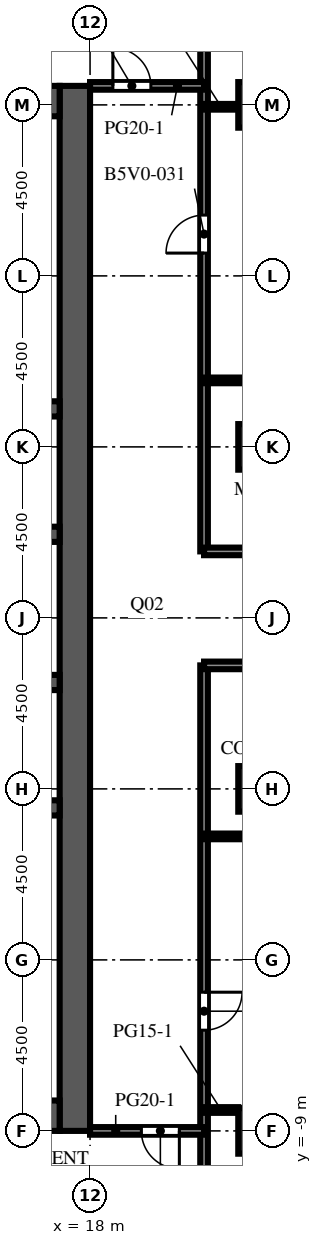
"""IFC4 building model, lengths in metres.
Left out: names, types, materials, properties, quantities, classifications, styles, units other than length and angle.
Written with IfcOpenShell. Run it as: python <this file> out.ifc"""

import sys

from ifc_helpers import new_model, si_unit, direction, frame, frame_2d, origin, origin_2d, place, context, subcontext, project, spatial, rectangle, extrude, element, fill, save


model = new_model("IFC4")
c1 = context("Model", 3, precision=1e-05, world=origin(), true_north=direction((0.0, 1.0)))
c2 = subcontext(c1, "Body", "Model", "MODEL_VIEW")
j1 = project(units=[si_unit("LENGTHUNIT", "METRE"), si_unit("PLANEANGLEUNIT", "RADIAN")], contexts=[c1])
p1 = place(None, origin())
s1 = spatial("IfcSite", under=j1, at=p1, CompositionType="ELEMENT")
p2 = place(p1, origin())
s2 = spatial("IfcBuilding", under=s1, at=p2, CompositionType="ELEMENT")
p3 = place(p2, frame((0.0, 0.0, 160.9)))
s3 = spatial("IfcBuildingStorey", under=s2, at=p3, CompositionType="ELEMENT", Elevation=160.9)
for number, where, z_axis, x_axis in (
    (1, (22.5, -9.0, 0.0), (0.0, 0.0, 1.0), (1.0, 0.0, 0.0)),
    (2, (22.5, 0.0, 0.0), (0.0, 0.0, 1.0), (1.0, 0.0, 0.0)),
    (3, (22.5, 9.0, 0.0), (0.0, 0.0, 1.0), (1.0, 0.0, 0.0)),
    (4, (22.5, 18.0, 0.0), (0.0, 0.0, 1.0), (1.0, 0.0, 0.0)),
):
    element("IfcColumn", number, at=place(p3, frame(where, z_axis=z_axis, x_axis=x_axis)), inside=s3, PredefinedType="COLUMN", context=c2, shape_type="SweptSolid", body=[
        extrude(rectangle(XDim=1.2, YDim=1.2, at=origin_2d()), origin(), (0.0, 0.0, 1.0), 4.1),
    ])
p4 = place(p3, frame((17.6, -9.0, 0.0), z_axis=(0.0, 0.0, 1.0), x_axis=(0.0, 1.0, 0.0)))
e5 = element("IfcWall", 5, at=p4, inside=s3, PredefinedType="SHEAR", context=c2, shape_type="SweptSolid", body=[
    extrude(rectangle(XDim=27.5, YDim=0.8, at=frame_2d((13.75, 0.0))), origin(), (0.0, 0.0, 1.0), 4.1),
])
p5 = place(p4, frame((12.55, 0.0, 0.0)))
e6 = element("IfcOpeningElement", 6, at=p5, cuts=e5, PredefinedType="OPENING", context=c2, shape_type="SweptSolid", body=[
    extrude(rectangle(XDim=2.4, YDim=2.4, at=frame_2d((1.2, 1.2))), frame((0.0, 0.41, 0.0), z_axis=(0.0, -1.0, 0.0), x_axis=(1.0, 0.0, 0.0)), (0.0, 0.0, 1.0), 0.82),
])
p6 = place(p4, frame((6.825, 0.0, 0.0)))
e7 = element("IfcOpeningElement", 7, at=p6, cuts=e5, PredefinedType="OPENING", context=c2, shape_type="SweptSolid", body=[
    extrude(rectangle(XDim=1.2, YDim=2.1, at=frame_2d((0.6, 1.05))), frame((0.0, 0.41, 0.0), z_axis=(0.0, -1.0, 0.0), x_axis=(1.0, 0.0, 0.0)), (0.0, 0.0, 1.0), 0.82),
])
p7 = place(p4, frame((19.475, 0.0, 0.0)))
e8 = element("IfcOpeningElement", 8, at=p7, cuts=e5, PredefinedType="OPENING", context=c2, shape_type="SweptSolid", body=[
    extrude(rectangle(XDim=1.2, YDim=2.1, at=frame_2d((0.6, 1.05))), frame((0.0, 0.41, 0.0), z_axis=(0.0, -1.0, 0.0), x_axis=(1.0, 0.0, 0.0)), (0.0, 0.0, 1.0), 0.82),
])
for number, where, z_axis, x_axis in (
    (9, (6.8, -8.6, 0.0), (0.0, 0.0, 1.0), (1.0, 0.0, 0.0)),
    (10, (6.8, 18.1, 0.0), (0.0, 0.0, 1.0), (1.0, 0.0, 0.0)),
):
    element("IfcWall", number, at=place(p3, frame(where, z_axis=z_axis, x_axis=x_axis)), inside=s3, PredefinedType="SHEAR", context=c2, shape_type="SweptSolid", body=[
        extrude(rectangle(XDim=10.4, YDim=0.8, at=frame_2d((5.2, 0.0))), origin(), (0.0, 0.0, 1.0), 4.1),
    ])
p8 = place(p3, frame((6.8, -0.5, 0.0), z_axis=(0.0, 0.0, 1.0), x_axis=(1.0, 0.0, 0.0)))
e11 = element("IfcWall", 11, at=p8, inside=s3, PredefinedType="SHEAR", context=c2, shape_type="SweptSolid", body=[
    extrude(rectangle(XDim=10.4, YDim=0.4, at=frame_2d((5.2, 0.0))), origin(), (0.0, 0.0, 1.0), 4.1),
])
p9 = place(p3, frame((6.8, 2.8, 0.0), z_axis=(0.0, 0.0, 1.0), x_axis=(1.0, 0.0, 0.0)))
e12 = element("IfcWall", 12, at=p9, inside=s3, PredefinedType="SHEAR", context=c2, shape_type="SweptSolid", body=[
    extrude(rectangle(XDim=10.4, YDim=0.4, at=frame_2d((5.2, 0.0))), origin(), (0.0, 0.0, 1.0), 4.1),
])
p10 = place(p9, frame((0.738, 0.0, 0.0)))
e13 = element("IfcOpeningElement", 13, at=p10, cuts=e12, PredefinedType="OPENING", context=c2, shape_type="SweptSolid", body=[
    extrude(rectangle(XDim=1.1, YDim=2.1, at=frame_2d((0.55, 1.05))), frame((0.0, 0.21, 0.0), z_axis=(0.0, -1.0, 0.0), x_axis=(1.0, 0.0, 0.0)), (0.0, 0.0, 1.0), 0.42),
])
p11 = place(p9, frame((3.337, 0.0, 0.0)))
e14 = element("IfcOpeningElement", 14, at=p11, cuts=e12, PredefinedType="OPENING", context=c2, shape_type="SweptSolid", body=[
    extrude(rectangle(XDim=1.1, YDim=2.1, at=frame_2d((0.55, 1.05))), frame((0.0, 0.21, 0.0), z_axis=(0.0, -1.0, 0.0), x_axis=(1.0, 0.0, 0.0)), (0.0, 0.0, 1.0), 0.42),
])
p12 = place(p9, frame((6.012, 0.0, 0.0)))
e15 = element("IfcOpeningElement", 15, at=p12, cuts=e12, PredefinedType="OPENING", context=c2, shape_type="SweptSolid", body=[
    extrude(rectangle(XDim=1.0, YDim=2.1, at=frame_2d((0.5, 1.05))), frame((0.0, 0.21, 0.0), z_axis=(0.0, -1.0, 0.0), x_axis=(1.0, 0.0, 0.0)), (0.0, 0.0, 1.0), 0.42),
])
p13 = place(p9, frame((8.613, 0.0, 0.0)))
e16 = element("IfcOpeningElement", 16, at=p13, cuts=e12, PredefinedType="OPENING", context=c2, shape_type="SweptSolid", body=[
    extrude(rectangle(XDim=1.0, YDim=2.1, at=frame_2d((0.5, 1.05))), frame((0.0, 0.21, 0.0), z_axis=(0.0, -1.0, 0.0), x_axis=(1.0, 0.0, 0.0)), (0.0, 0.0, 1.0), 0.42),
])
p14 = place(p3, frame((6.8, 6.7, 0.0), z_axis=(0.0, 0.0, 1.0), x_axis=(1.0, 0.0, 0.0)))
e17 = element("IfcWall", 17, at=p14, inside=s3, PredefinedType="SHEAR", context=c2, shape_type="SweptSolid", body=[
    extrude(rectangle(XDim=10.4, YDim=0.4, at=frame_2d((5.2, 0.0))), origin(), (0.0, 0.0, 1.0), 4.1),
])
p15 = place(p14, frame((3.337, 0.0, 0.0)))
e18 = element("IfcOpeningElement", 18, at=p15, cuts=e17, PredefinedType="OPENING", context=c2, shape_type="SweptSolid", body=[
    extrude(rectangle(XDim=1.1, YDim=2.1, at=frame_2d((0.55, 1.05))), frame((0.0, 0.21, 0.0), z_axis=(0.0, -1.0, 0.0), x_axis=(1.0, 0.0, 0.0)), (0.0, 0.0, 1.0), 0.42),
])
p16 = place(p14, frame((5.962, 0.0, 0.0)))
e19 = element("IfcOpeningElement", 19, at=p16, cuts=e17, PredefinedType="OPENING", context=c2, shape_type="SweptSolid", body=[
    extrude(rectangle(XDim=1.1, YDim=2.1, at=frame_2d((0.55, 1.05))), frame((0.0, 0.21, 0.0), z_axis=(0.0, -1.0, 0.0), x_axis=(1.0, 0.0, 0.0)), (0.0, 0.0, 1.0), 0.42),
])
p17 = place(p14, frame((8.663, 0.0, 0.0)))
e20 = element("IfcOpeningElement", 20, at=p17, cuts=e17, PredefinedType="OPENING", context=c2, shape_type="SweptSolid", body=[
    extrude(rectangle(XDim=1.1, YDim=2.1, at=frame_2d((0.55, 1.05))), frame((0.0, 0.21, 0.0), z_axis=(0.0, -1.0, 0.0), x_axis=(1.0, 0.0, 0.0)), (0.0, 0.0, 1.0), 0.42),
])
p18 = place(p14, frame((0.688, 0.0, 0.0)))
e21 = element("IfcOpeningElement", 21, at=p18, cuts=e17, PredefinedType="OPENING", context=c2, shape_type="SweptSolid", body=[
    extrude(rectangle(XDim=1.0, YDim=2.1, at=frame_2d((0.5, 1.05))), frame((0.0, 0.21, 0.0), z_axis=(0.0, -1.0, 0.0), x_axis=(1.0, 0.0, 0.0)), (0.0, 0.0, 1.0), 0.42),
])
p19 = place(p3, frame((6.8, 10.0, 0.0), z_axis=(0.0, 0.0, 1.0), x_axis=(1.0, 0.0, 0.0)))
e22 = element("IfcWall", 22, at=p19, inside=s3, PredefinedType="SHEAR", context=c2, shape_type="SweptSolid", body=[
    extrude(rectangle(XDim=10.4, YDim=0.4, at=frame_2d((5.2, 0.0))), origin(), (0.0, 0.0, 1.0), 4.1),
])
p20 = place(p3, frame((21.0, 3.25, 0.0), z_axis=(0.0, 0.0, 1.0), x_axis=(0.0, -1.0, 0.0)))
e23 = element("IfcWall", 23, at=p20, inside=s3, PredefinedType="PARTITIONING", context=c2, shape_type="SweptSolid", body=[
    extrude(rectangle(XDim=30.1, YDim=0.2, at=frame_2d((15.05, 0.0))), origin(), (0.0, 0.0, 1.0), 3.65),
])
p21 = place(p20, frame((8.6, 0.0, 0.0)))
e24 = element("IfcOpeningElement", 24, at=p21, cuts=e23, PredefinedType="OPENING", context=c2, shape_type="SweptSolid", body=[
    extrude(rectangle(XDim=1.0, YDim=2.1, at=frame_2d((0.5, 1.05))), frame((0.0, 0.11, 0.0), z_axis=(0.0, -1.0, 0.0), x_axis=(1.0, 0.0, 0.0)), (0.0, 0.0, 1.0), 0.22),
])
p22 = place(p3, frame((21.0, 26.85, 0.0), z_axis=(0.0, 0.0, 1.0), x_axis=(0.0, -1.0, 0.0)))
e25 = element("IfcWall", 25, at=p22, inside=s3, PredefinedType="PARTITIONING", context=c2, shape_type="SweptSolid", body=[
    extrude(rectangle(XDim=20.6, YDim=0.2, at=frame_2d((10.3, 0.0))), origin(), (0.0, 0.0, 1.0), 3.65),
])
p23 = place(p22, frame((11.75, 0.0, 0.0)))
e26 = element("IfcOpeningElement", 26, at=p23, cuts=e25, PredefinedType="OPENING", context=c2, shape_type="SweptSolid", body=[
    extrude(rectangle(XDim=1.0, YDim=2.1, at=frame_2d((0.5, 1.05))), frame((0.0, 0.11, 0.0), z_axis=(0.0, -1.0, 0.0), x_axis=(1.0, 0.0, 0.0)), (0.0, 0.0, 1.0), 0.22),
])
p24 = place(p3, frame((21.0, -9.0, 0.0), z_axis=(0.0, 0.0, 1.0), x_axis=(-1.0, 0.0, 0.0)))
e27 = element("IfcWall", 27, at=p24, inside=s3, PredefinedType="PARTITIONING", context=c2, shape_type="SweptSolid", body=[
    extrude(rectangle(XDim=3.0, YDim=0.2, at=frame_2d((1.5, 0.0))), origin(), (0.0, 0.0, 1.0), 3.65),
])
p25 = place(p24, frame((0.65, 0.0, 0.0)))
e28 = element("IfcOpeningElement", 28, at=p25, cuts=e27, PredefinedType="OPENING", context=c2, shape_type="SweptSolid", body=[
    extrude(rectangle(XDim=1.0, YDim=2.1, at=frame_2d((0.5, 1.05))), frame((0.0, 0.11, 0.0), z_axis=(0.0, -1.0, 0.0), x_axis=(1.0, 0.0, 0.0)), (0.0, 0.0, 1.0), 0.22),
])
p26 = place(p3, frame((21.0, -8.45, 0.0), z_axis=(0.0, 0.0, 1.0), x_axis=(1.0, 0.0, 0.0)))
e29 = element("IfcWall", 29, at=p26, inside=s3, PredefinedType="PARTITIONING", context=c2, shape_type="SweptSolid", body=[
    extrude(rectangle(XDim=0.9, YDim=0.15, at=frame_2d((0.45, 0.0))), origin(), (0.0, 0.0, 1.0), 3.65),
])
p27 = place(p3, frame((21.0, -1.25, 0.0), z_axis=(0.0, 0.0, 1.0), x_axis=(1.0, 0.0, 0.0)))
e30 = element("IfcWall", 30, at=p27, inside=s3, PredefinedType="PARTITIONING", context=c2, shape_type="SweptSolid", body=[
    extrude(rectangle(XDim=5.85, YDim=0.15, at=frame_2d((2.925, 0.0))), origin(), (0.0, 0.0, 1.0), 3.65),
])
p28 = place(p27, frame((3.35, 0.0, 0.0)))
e31 = element("IfcOpeningElement", 31, at=p28, cuts=e30, PredefinedType="OPENING", context=c2, shape_type="SweptSolid", body=[
    extrude(rectangle(XDim=1.0, YDim=2.1, at=frame_2d((0.5, 1.05))), frame((0.0, 0.085, 0.0), z_axis=(0.0, -1.0, 0.0), x_axis=(1.0, 0.0, 0.0)), (0.0, 0.0, 1.0), 0.17),
])
for number, where, z_axis, x_axis in (
    (32, (21.0, 3.25, 0.0), (0.0, 0.0, 1.0), (1.0, 0.0, 0.0)),
    (33, (21.0, 6.25, 0.0), (0.0, 0.0, 1.0), (1.0, 0.0, 0.0)),
):
    element("IfcWall", number, at=place(p3, frame(where, z_axis=z_axis, x_axis=x_axis)), inside=s3, PredefinedType="PARTITIONING", context=c2, shape_type="SweptSolid", body=[
        extrude(rectangle(XDim=5.85, YDim=0.2, at=frame_2d((2.925, 0.0))), origin(), (0.0, 0.0, 1.0), 3.65),
    ])
p29 = place(p3, frame((26.85, 10.75, 0.0), z_axis=(0.0, 0.0, 1.0), x_axis=(-1.0, 0.0, 0.0)))
e34 = element("IfcWall", 34, at=p29, inside=s3, PredefinedType="PARTITIONING", context=c2, shape_type="SweptSolid", body=[
    extrude(rectangle(XDim=5.85, YDim=0.15, at=frame_2d((2.925, 0.0))), origin(), (0.0, 0.0, 1.0), 3.65),
])
p30 = place(p29, frame((2.5, 0.0, 0.0)))
e35 = element("IfcOpeningElement", 35, at=p30, cuts=e34, PredefinedType="OPENING", context=c2, shape_type="SweptSolid", body=[
    extrude(rectangle(XDim=1.0, YDim=2.1, at=frame_2d((0.5, 1.05))), frame((0.0, 0.085, 0.0), z_axis=(0.0, -1.0, 0.0), x_axis=(1.0, 0.0, 0.0)), (0.0, 0.0, 1.0), 0.17),
])
p31 = place(p3, frame((21.0, 17.95, 0.0), z_axis=(0.0, 0.0, 1.0), x_axis=(1.0, 0.0, 0.0)))
e36 = element("IfcWall", 36, at=p31, inside=s3, PredefinedType="PARTITIONING", context=c2, shape_type="SweptSolid", body=[
    extrude(rectangle(XDim=0.9, YDim=0.15, at=frame_2d((0.45, 0.0))), origin(), (0.0, 0.0, 1.0), 3.65),
])
p32 = place(p3, frame((18.0, 18.5, 0.0), z_axis=(0.0, 0.0, 1.0), x_axis=(1.0, 0.0, 0.0)))
e37 = element("IfcWall", 37, at=p32, inside=s3, PredefinedType="PARTITIONING", context=c2, shape_type="SweptSolid", body=[
    extrude(rectangle(XDim=3.0, YDim=0.2, at=frame_2d((1.5, 0.0))), origin(), (0.0, 0.0, 1.0), 3.65),
])
p33 = place(p32, frame((0.6, 0.0, 0.0)))
e38 = element("IfcOpeningElement", 38, at=p33, cuts=e37, PredefinedType="OPENING", context=c2, shape_type="SweptSolid", body=[
    extrude(rectangle(XDim=1.0, YDim=2.1, at=frame_2d((0.5, 1.05))), frame((0.0, 0.11, 0.0), z_axis=(0.0, -1.0, 0.0), x_axis=(1.0, 0.0, 0.0)), (0.0, 0.0, 1.0), 0.22),
])
p34 = place(p5, origin())
e39 = element("IfcDoor", 39, at=p34, inside=s3, OperationType="DOUBLE_DOOR_DOUBLE_SWING", PredefinedType="DOOR", context=c2, shape_type="SweptSolid", body=[
    extrude(rectangle(XDim=2.4, YDim=2.4, at=frame_2d((1.2, 1.2))), frame((0.0, 0.025, 0.0), z_axis=(0.0, -1.0, 0.0), x_axis=(1.0, 0.0, 0.0)), (0.0, 0.0, 1.0), 0.05),
])
fill(e6, e39)
p35 = place(p6, frame((1.2, 0.0, 0.0), z_axis=(0.0, 0.0, 1.0), x_axis=(-1.0, 0.0, 0.0)))
e40 = element("IfcDoor", 40, at=p35, inside=s3, OperationType="SINGLE_SWING_LEFT", PredefinedType="DOOR", context=c2, shape_type="SweptSolid", body=[
    extrude(rectangle(XDim=1.2, YDim=2.1, at=frame_2d((0.6, 1.05))), frame((0.0, 0.025, 0.0), z_axis=(0.0, -1.0, 0.0), x_axis=(1.0, 0.0, 0.0)), (0.0, 0.0, 1.0), 0.05),
])
fill(e7, e40)
p36 = place(p7, frame((1.2, 0.0, 0.0), z_axis=(0.0, 0.0, 1.0), x_axis=(-1.0, 0.0, 0.0)))
e41 = element("IfcDoor", 41, at=p36, inside=s3, OperationType="SINGLE_SWING_LEFT", PredefinedType="DOOR", context=c2, shape_type="SweptSolid", body=[
    extrude(rectangle(XDim=1.2, YDim=2.1, at=frame_2d((0.6, 1.05))), frame((0.0, 0.025, 0.0), z_axis=(0.0, -1.0, 0.0), x_axis=(1.0, 0.0, 0.0)), (0.0, 0.0, 1.0), 0.05),
])
fill(e8, e41)
p37 = place(p25, origin())
e42 = element("IfcDoor", 42, at=p37, inside=s3, OperationType="SINGLE_SWING_LEFT", PredefinedType="DOOR", context=c2, shape_type="SweptSolid", body=[
    extrude(rectangle(XDim=1.0, YDim=2.1, at=frame_2d((0.5, 1.05))), frame((0.0, 0.025, 0.0), z_axis=(0.0, -1.0, 0.0), x_axis=(1.0, 0.0, 0.0)), (0.0, 0.0, 1.0), 0.05),
])
fill(e28, e42)
p38 = place(p33, origin())
e43 = element("IfcDoor", 43, at=p38, inside=s3, OperationType="SINGLE_SWING_LEFT", PredefinedType="DOOR", context=c2, shape_type="SweptSolid", body=[
    extrude(rectangle(XDim=1.0, YDim=2.1, at=frame_2d((0.5, 1.05))), frame((0.0, 0.025, 0.0), z_axis=(0.0, -1.0, 0.0), x_axis=(1.0, 0.0, 0.0)), (0.0, 0.0, 1.0), 0.05),
])
fill(e38, e43)
p39 = place(p21, origin())
e44 = element("IfcDoor", 44, at=p39, inside=s3, OperationType="SINGLE_SWING_LEFT", PredefinedType="DOOR", context=c2, shape_type="SweptSolid", body=[
    extrude(rectangle(XDim=1.0, YDim=2.1, at=frame_2d((0.5, 1.05))), frame((0.0, 0.025, 0.0), z_axis=(0.0, -1.0, 0.0), x_axis=(1.0, 0.0, 0.0)), (0.0, 0.0, 1.0), 0.05),
])
fill(e24, e44)
p40 = place(p23, origin())
e45 = element("IfcDoor", 45, at=p40, inside=s3, OperationType="SINGLE_SWING_RIGHT", PredefinedType="DOOR", context=c2, shape_type="SweptSolid", body=[
    extrude(rectangle(XDim=1.0, YDim=2.1, at=frame_2d((0.5, 1.05))), frame((0.0, 0.025, 0.0), z_axis=(0.0, -1.0, 0.0), x_axis=(1.0, 0.0, 0.0)), (0.0, 0.0, 1.0), 0.05),
])
fill(e26, e45)
save(model, sys.argv[1])
